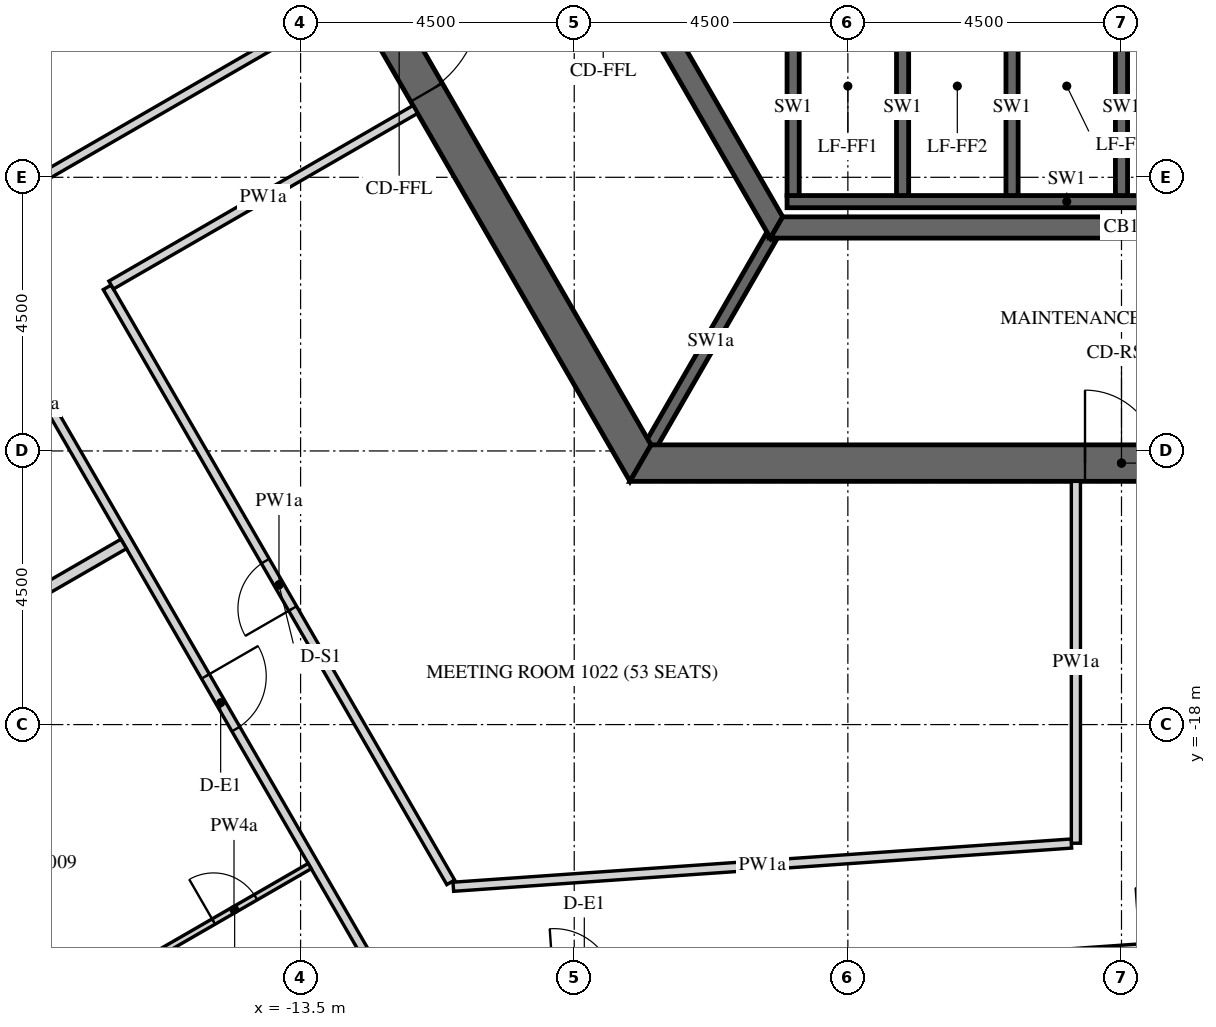
"""IFC4 building model, lengths in metres.
Left out: names, types, materials, properties, quantities, classifications, styles, units other than length and angle.
Written with IfcOpenShell. Run it as: python <this file> out.ifc"""

import sys

from ifc_helpers import new_model, si_unit, direction, frame, frame_2d, origin, place, context, subcontext, project, spatial, polyline, rectangle, outline, extrude, element, fill, save


model = new_model("IFC4")
c1 = context("Model", 3, precision=1e-05, world=origin(), true_north=direction((0.0, 1.0)))
c2 = subcontext(c1, "Body", "Model", "MODEL_VIEW")
j1 = project(units=[si_unit("LENGTHUNIT", "METRE"), si_unit("PLANEANGLEUNIT", "RADIAN")], contexts=[c1])
p1 = place(None, origin())
s1 = spatial("IfcSite", under=j1, at=p1, CompositionType="ELEMENT")
p2 = place(p1, origin())
s2 = spatial("IfcBuilding", under=s1, at=p2, CompositionType="ELEMENT")
p3 = place(p2, frame((0.0, 0.0, 135.0)))
s3 = spatial("IfcBuildingStorey", under=s2, at=p3, CompositionType="ELEMENT", Elevation=135.0)
p4 = place(p3, frame((-32.655, -2.89, -0.15), z_axis=(0.0, 0.0, 1.0), x_axis=(0.499997711317, -0.866026725152, 0.0)))
e1 = element("IfcWall", 1, at=p4, inside=s3, PredefinedType="SOLIDWALL", context=c2, shape_type="SweptSolid", body=[
    extrude(outline(polyline([(-0.022, -0.275), (30.097, -0.275), (30.045, 0.275), (0.022, 0.275), (-0.022, -0.275)])), origin(), (0.0, 0.0, 1.0), 3.9),
])
p5 = place(p4, frame((1.236, 0.0, 1.05)))
e2 = element("IfcOpeningElement", 2, at=p5, cuts=e1, PredefinedType="OPENING", context=c2, shape_type="SweptSolid", body=[
    extrude(rectangle(XDim=2.4, YDim=2.4, at=frame_2d((1.2, 1.2))), frame((0.0, 0.285, 0.0), z_axis=(0.0, -1.0, 0.0), x_axis=(1.0, 0.0, 0.0)), (0.0, 0.0, 1.0), 0.57),
])
p6 = place(p4, frame((4.835, 0.0, 1.05)))
e3 = element("IfcOpeningElement", 3, at=p6, cuts=e1, PredefinedType="OPENING", context=c2, shape_type="SweptSolid", body=[
    extrude(rectangle(XDim=2.4, YDim=2.4, at=frame_2d((1.2, 1.2))), frame((0.0, 0.285, 0.0), z_axis=(0.0, -1.0, 0.0), x_axis=(1.0, 0.0, 0.0)), (0.0, 0.0, 1.0), 0.57),
])
p7 = place(p4, frame((8.436, 0.0, 1.05)))
e4 = element("IfcOpeningElement", 4, at=p7, cuts=e1, PredefinedType="OPENING", context=c2, shape_type="SweptSolid", body=[
    extrude(rectangle(XDim=2.4, YDim=2.4, at=frame_2d((1.2, 1.2))), frame((0.0, 0.285, 0.0), z_axis=(0.0, -1.0, 0.0), x_axis=(1.0, 0.0, 0.0)), (0.0, 0.0, 1.0), 0.57),
])
p8 = place(p4, frame((12.035, 0.0, 1.05)))
e5 = element("IfcOpeningElement", 5, at=p8, cuts=e1, PredefinedType="OPENING", context=c2, shape_type="SweptSolid", body=[
    extrude(rectangle(XDim=2.4, YDim=2.4, at=frame_2d((1.2, 1.2))), frame((0.0, 0.285, 0.0), z_axis=(0.0, -1.0, 0.0), x_axis=(1.0, 0.0, 0.0)), (0.0, 0.0, 1.0), 0.57),
])
p9 = place(p4, frame((15.635, 0.0, 1.05)))
e6 = element("IfcOpeningElement", 6, at=p9, cuts=e1, PredefinedType="OPENING", context=c2, shape_type="SweptSolid", body=[
    extrude(rectangle(XDim=2.4, YDim=2.4, at=frame_2d((1.2, 1.2))), frame((0.0, 0.285, 0.0), z_axis=(0.0, -1.0, 0.0), x_axis=(1.0, 0.0, 0.0)), (0.0, 0.0, 1.0), 0.57),
])
p10 = place(p4, frame((19.236, 0.0, 1.05)))
e7 = element("IfcOpeningElement", 7, at=p10, cuts=e1, PredefinedType="OPENING", context=c2, shape_type="SweptSolid", body=[
    extrude(rectangle(XDim=2.4, YDim=2.4, at=frame_2d((1.2, 1.2))), frame((0.0, 0.285, 0.0), z_axis=(0.0, -1.0, 0.0), x_axis=(1.0, 0.0, 0.0)), (0.0, 0.0, 1.0), 0.57),
])
p11 = place(p4, frame((22.835, 0.0, 1.05)))
e8 = element("IfcOpeningElement", 8, at=p11, cuts=e1, PredefinedType="OPENING", context=c2, shape_type="SweptSolid", body=[
    extrude(rectangle(XDim=2.4, YDim=2.4, at=frame_2d((1.2, 1.2))), frame((0.0, 0.285, 0.0), z_axis=(0.0, -1.0, 0.0), x_axis=(1.0, 0.0, 0.0)), (0.0, 0.0, 1.0), 0.57),
])
p12 = place(p4, frame((26.436, 0.0, 1.05)))
e9 = element("IfcOpeningElement", 9, at=p12, cuts=e1, PredefinedType="OPENING", context=c2, shape_type="SweptSolid", body=[
    extrude(rectangle(XDim=2.4, YDim=2.4, at=frame_2d((1.2, 1.2))), frame((0.0, 0.285, 0.0), z_axis=(0.0, -1.0, 0.0), x_axis=(1.0, 0.0, 0.0)), (0.0, 0.0, 1.0), 0.57),
])
p13 = place(p3, frame((-15.819, 0.0, -0.15), z_axis=(0.0, 0.0, 1.0), x_axis=(0.499999880136, -0.866025472988, 0.0)))
e10 = element("IfcWall", 10, at=p13, inside=s3, PredefinedType="SHEAR", context=c2, shape_type="SweptSolid", body=[
    extrude(outline(polyline([(-0.173, -0.3), (15.993, -0.3), (15.646, 0.3), (0.173, 0.3), (-0.173, -0.3)])), origin(), (0.0, 0.0, 1.0), 3.9),
])
p14 = place(p13, frame((6.981, 0.0, 0.15)))
e11 = element("IfcOpeningElement", 11, at=p14, cuts=e10, PredefinedType="OPENING", context=c2, shape_type="SweptSolid", body=[
    extrude(rectangle(XDim=1.8, YDim=2.4, at=frame_2d((0.9, 1.2))), frame((0.0, 0.31, 0.0), z_axis=(0.0, -1.0, 0.0), x_axis=(1.0, 0.0, 0.0)), (0.0, 0.0, 1.0), 0.62),
])
p15 = place(p3, frame((-7.91, -13.7, -0.15), z_axis=(0.0, 0.0, 1.0), x_axis=(1.0, 0.0, 0.0)))
e12 = element("IfcWall", 12, at=p15, inside=s3, PredefinedType="SHEAR", context=c2, shape_type="SweptSolid", body=[
    extrude(outline(polyline([(-0.173, -0.3), (15.993, -0.3), (15.646, 0.3), (0.173, 0.3), (-0.173, -0.3)])), origin(), (0.0, 0.0, 1.0), 3.9),
])
p16 = place(p15, frame((7.31, 0.0, 0.15)))
e13 = element("IfcOpeningElement", 13, at=p16, cuts=e12, PredefinedType="OPENING", context=c2, shape_type="SweptSolid", body=[
    extrude(rectangle(XDim=1.2, YDim=2.4, at=frame_2d((0.6, 1.2))), frame((0.0, 0.31, 0.0), z_axis=(0.0, -1.0, 0.0), x_axis=(1.0, 0.0, 0.0)), (0.0, 0.0, 1.0), 0.62),
])
p17 = place(p3, frame((-11.345, 0.0, -0.15), z_axis=(0.0, 0.0, 1.0), x_axis=(0.499995046907, -0.866028263435, 0.0)))
e14 = element("IfcWall", 14, at=p17, inside=s3, PredefinedType="SHEAR", context=c2, shape_type="SweptSolid", body=[
    extrude(outline(polyline([(-0.101, -0.175), (11.446, -0.175), (11.244, 0.175), (0.101, 0.175), (-0.101, -0.175)])), origin(), (0.0, 0.0, 1.0), 3.9),
])
p18 = place(p17, frame((4.744, 0.0, 0.15)))
e15 = element("IfcOpeningElement", 15, at=p18, cuts=e14, PredefinedType="OPENING", context=c2, shape_type="SweptSolid", body=[
    extrude(rectangle(XDim=1.8, YDim=2.4, at=frame_2d((0.9, 1.2))), frame((0.0, 0.185, 0.0), z_axis=(0.0, -1.0, 0.0), x_axis=(1.0, 0.0, 0.0)), (0.0, 0.0, 1.0), 0.37),
])
p19 = place(p3, frame((-5.673, -9.825, -0.15), z_axis=(0.0, 0.0, 1.0), x_axis=(1.0, 0.0, 0.0)))
e16 = element("IfcWall", 16, at=p19, inside=s3, PredefinedType="SHEAR", context=c2, shape_type="SweptSolid", body=[
    extrude(outline(polyline([(-0.101, -0.175), (11.446, -0.175), (11.244, 0.175), (0.101, 0.175), (-0.101, -0.175)])), origin(), (0.0, 0.0, 1.0), 3.9),
])
p20 = place(p3, frame((-5.5, -9.4, -0.25), z_axis=(0.0, 0.0, 1.0), x_axis=(1.0, 0.0, 0.0)))
e17 = element("IfcWall", 17, at=p20, inside=s3, PredefinedType="SHEAR", context=c2, shape_type="SweptSolid", body=[
    extrude(rectangle(XDim=9.2, YDim=0.2, at=frame_2d((4.6, 0.0))), origin(), (0.0, 0.0, 1.0), 3.9),
])
for number, where, z_axis, x_axis in (
    (18, (-5.4, -9.3, -0.25), (0.0, 0.0, 1.0), (0.0, 1.0, 0.0)),
    (19, (-3.6, -9.3, -0.25), (0.0, 0.0, 1.0), (0.0, 1.0, 0.0)),
    (20, (-1.8, -9.3, -0.25), (0.0, 0.0, 1.0), (0.0, 1.0, 0.0)),
    (21, (0.0, -9.3, -0.25), (0.0, 0.0, 1.0), (0.0, 1.0, 0.0)),
):
    element("IfcWall", number, at=place(p3, frame(where, z_axis=z_axis, x_axis=x_axis)), inside=s3, PredefinedType="SHEAR", context=c2, shape_type="SweptSolid", body=[
        extrude(rectangle(XDim=2.9, YDim=0.2, at=frame_2d((1.45, 0.0))), origin(), (0.0, 0.0, 1.0), 3.9),
    ])
p21 = place(p3, frame((-5.773, -10.0, -0.15), z_axis=(0.0, 0.0, 1.0), x_axis=(-0.500038251005, -0.86600331843, 0.0)))
e22 = element("IfcWall", 22, at=p21, inside=s3, PredefinedType="SHEAR", context=c2, shape_type="SweptSolid", body=[
    extrude(rectangle(XDim=3.926, YDim=0.2, at=frame_2d((1.963, 0.0))), origin(), (0.0, 0.0, 1.0), 3.9),
])
p22 = place(p3, frame((-23.743, -2.175, 0.0), z_axis=(0.0, 0.0, 1.0), x_axis=(0.499992353047, -0.86602981871, 0.0)))
e23 = element("IfcWall", 23, at=p22, inside=s3, PredefinedType="PARTITIONING", context=c2, shape_type="SweptSolid", body=[
    extrude(rectangle(XDim=23.516, YDim=0.15, at=frame_2d((11.758, 0.0))), origin(), (0.0, 0.0, 1.0), 2.838),
])
p23 = place(p22, frame((10.099, 0.0, 0.0)))
e24 = element("IfcOpeningElement", 24, at=p23, cuts=e23, PredefinedType="OPENING", context=c2, shape_type="SweptSolid", body=[
    extrude(rectangle(XDim=1.0, YDim=2.1, at=frame_2d((0.5, 1.05))), frame((0.0, 0.085, 0.0), z_axis=(0.0, -1.0, 0.0), x_axis=(1.0, 0.0, 0.0)), (0.0, 0.0, 1.0), 0.17),
])
p24 = place(p22, frame((17.358, 0.0, 0.0)))
e25 = element("IfcOpeningElement", 25, at=p24, cuts=e23, PredefinedType="OPENING", context=c2, shape_type="SweptSolid", body=[
    extrude(rectangle(XDim=1.0, YDim=2.1, at=frame_2d((0.5, 1.05))), frame((0.0, 0.085, 0.0), z_axis=(0.0, -1.0, 0.0), x_axis=(1.0, 0.0, 0.0)), (0.0, 0.0, 1.0), 0.17),
])
p25 = place(p3, frame((-11.902, -22.535, 0.0), z_axis=(0.0, 0.0, 1.0), x_axis=(0.997563830208, 0.069759620556, 0.0)))
e26 = element("IfcWall", 26, at=p25, inside=s3, PredefinedType="PARTITIONING", context=c2, shape_type="SweptSolid", body=[
    extrude(rectangle(XDim=19.434, YDim=0.15, at=frame_2d((9.717, 0.0))), origin(), (0.0, 0.0, 1.0), 2.838),
])
p26 = place(p25, frame((2.575, 0.0, 0.0)))
e27 = element("IfcOpeningElement", 27, at=p26, cuts=e26, PredefinedType="OPENING", context=c2, shape_type="SweptSolid", body=[
    extrude(rectangle(XDim=1.0, YDim=2.1, at=frame_2d((0.5, 1.05))), frame((0.0, 0.085, 0.0), z_axis=(0.0, -1.0, 0.0), x_axis=(1.0, 0.0, 0.0)), (0.0, 0.0, 1.0), 0.17),
])
p27 = place(p25, frame((12.234, 0.0, 0.0)))
e28 = element("IfcOpeningElement", 28, at=p27, cuts=e26, PredefinedType="OPENING", context=c2, shape_type="SweptSolid", body=[
    extrude(rectangle(XDim=1.0, YDim=2.1, at=frame_2d((0.5, 1.05))), frame((0.0, 0.085, 0.0), z_axis=(0.0, -1.0, 0.0), x_axis=(1.0, 0.0, 0.0)), (0.0, 0.0, 1.0), 0.17),
])
p28 = place(p3, frame((-12.664, -6.066, 0.0), z_axis=(0.0, 0.0, 1.0), x_axis=(-0.866018092707, -0.500012662943, 0.0)))
e29 = element("IfcWall", 29, at=p28, inside=s3, PredefinedType="PARTITIONING", context=c2, shape_type="SweptSolid", body=[
    extrude(rectangle(XDim=5.85, YDim=0.15, at=frame_2d((2.925, 0.0))), origin(), (0.0, 0.0, 1.0), 2.838),
])
p29 = place(p3, frame((-0.75, -14.0, 0.0), z_axis=(0.0, 0.0, 1.0), x_axis=(0.0, -1.0, 0.0)))
e30 = element("IfcWall", 30, at=p29, inside=s3, PredefinedType="PARTITIONING", context=c2, shape_type="SweptSolid", body=[
    extrude(rectangle(XDim=5.951, YDim=0.15, at=frame_2d((2.976, 0.0))), origin(), (0.0, 0.0, 1.0), 2.838),
])
p30 = place(p3, frame((-0.825, -19.956, 0.0), z_axis=(0.0, 0.0, 1.0), x_axis=(-0.997562587881, -0.069777383582, 0.0)))
e31 = element("IfcWall", 31, at=p30, inside=s3, PredefinedType="PARTITIONING", context=c2, shape_type="SweptSolid", body=[
    extrude(rectangle(XDim=10.189, YDim=0.15, at=frame_2d((5.094, 0.0))), origin(), (0.0, 0.0, 1.0), 2.838),
])
p31 = place(p3, frame((-11.031, -20.595, 0.0), z_axis=(0.0, 0.0, 1.0), x_axis=(-0.499987422378, 0.866032665356, 0.0)))
e32 = element("IfcWall", 32, at=p31, inside=s3, PredefinedType="PARTITIONING", context=c2, shape_type="SweptSolid", body=[
    extrude(rectangle(XDim=11.299, YDim=0.15, at=frame_2d((5.649, 0.0))), origin(), (0.0, 0.0, 1.0), 2.838),
])
p32 = place(p31, frame((5.199, 0.0, 0.0)))
e33 = element("IfcOpeningElement", 33, at=p32, cuts=e32, PredefinedType="OPENING", context=c2, shape_type="SweptSolid", body=[
    extrude(rectangle(XDim=0.9, YDim=2.1, at=frame_2d((0.45, 1.05))), frame((0.0, 0.085, 0.0), z_axis=(0.0, -1.0, 0.0), x_axis=(1.0, 0.0, 0.0)), (0.0, 0.0, 1.0), 0.17),
])
p33 = place(p3, frame((-16.615, -10.772, 0.0), z_axis=(0.0, 0.0, 1.0), x_axis=(0.866025774745, 0.499999357477, 0.0)))
e34 = element("IfcWall", 34, at=p33, inside=s3, PredefinedType="PARTITIONING", context=c2, shape_type="SweptSolid", body=[
    extrude(rectangle(XDim=5.775, YDim=0.15, at=frame_2d((2.887, 0.0))), origin(), (0.0, 0.0, 1.0), 2.838),
])
p34 = place(p3, frame((-23.099, -18.892, 0.0), z_axis=(0.0, 0.0, 1.0), x_axis=(0.866019273868, 0.500010617176, 0.0)))
e35 = element("IfcWall", 35, at=p34, inside=s3, PredefinedType="PARTITIONING", context=c2, shape_type="SweptSolid", body=[
    extrude(rectangle(XDim=7.725, YDim=0.18, at=frame_2d((3.862, 0.0))), origin(), (0.0, 0.0, 1.0), 2.838),
])
p35 = place(p3, frame((-15.84, -21.764, 0.0), z_axis=(0.0, 0.0, 1.0), x_axis=(0.866039941686, 0.499974818771, 0.0)))
e36 = element("IfcWall", 36, at=p35, inside=s3, PredefinedType="PARTITIONING", context=c2, shape_type="SweptSolid", body=[
    extrude(rectangle(XDim=2.875, YDim=0.1, at=frame_2d((1.438, 0.0))), origin(), (0.0, 0.0, 1.0), 2.838),
])
p36 = place(p35, frame((1.05, 0.0, 0.0)))
e37 = element("IfcOpeningElement", 37, at=p36, cuts=e36, PredefinedType="OPENING", context=c2, shape_type="SweptSolid", body=[
    extrude(rectangle(XDim=0.8, YDim=2.1, at=frame_2d((0.4, 1.05))), frame((0.0, 0.06, 0.0), z_axis=(0.0, -1.0, 0.0), x_axis=(1.0, 0.0, 0.0)), (0.0, 0.0, 1.0), 0.12),
])
p37 = place(p14, origin())
e38 = element("IfcDoor", 38, at=p37, inside=s3, OperationType="DOUBLE_DOOR_SINGLE_SWING", PredefinedType="DOOR", context=c2, shape_type="SweptSolid", body=[
    extrude(rectangle(XDim=1.8, YDim=2.4, at=frame_2d((0.9, 1.2))), frame((0.0, 0.025, 0.0), z_axis=(0.0, -1.0, 0.0), x_axis=(1.0, 0.0, 0.0)), (0.0, 0.0, 1.0), 0.05),
])
fill(e11, e38)
p38 = place(p16, origin())
e39 = element("IfcDoor", 39, at=p38, inside=s3, OperationType="SINGLE_SWING_LEFT", PredefinedType="DOOR", context=c2, shape_type="SweptSolid", body=[
    extrude(rectangle(XDim=1.2, YDim=2.4, at=frame_2d((0.6, 1.2))), frame((0.0, 0.025, 0.0), z_axis=(0.0, -1.0, 0.0), x_axis=(1.0, 0.0, 0.0)), (0.0, 0.0, 1.0), 0.05),
])
fill(e13, e39)
p39 = place(p24, origin())
e40 = element("IfcDoor", 40, at=p39, inside=s3, OperationType="SINGLE_SWING_RIGHT", PredefinedType="DOOR", context=c2, shape_type="SweptSolid", body=[
    extrude(rectangle(XDim=1.0, YDim=2.1, at=frame_2d((0.5, 1.05))), frame((0.0, 0.025, 0.0), z_axis=(0.0, -1.0, 0.0), x_axis=(1.0, 0.0, 0.0)), (0.0, 0.0, 1.0), 0.05),
])
fill(e25, e40)
p40 = place(p36, origin())
e41 = element("IfcDoor", 41, at=p40, inside=s3, OperationType="SINGLE_SWING_LEFT", PredefinedType="DOOR", context=c2, shape_type="SweptSolid", body=[
    extrude(rectangle(XDim=0.8, YDim=2.1, at=frame_2d((0.4, 1.05))), frame((0.0, 0.025, 0.0), z_axis=(0.0, -1.0, 0.0), x_axis=(1.0, 0.0, 0.0)), (0.0, 0.0, 1.0), 0.05),
])
fill(e37, e41)
p41 = place(p32, origin())
e42 = element("IfcDoor", 42, at=p41, inside=s3, OperationType="SINGLE_SWING_RIGHT", PredefinedType="DOOR", context=c2, shape_type="SweptSolid", body=[
    extrude(rectangle(XDim=0.9, YDim=2.1, at=frame_2d((0.45, 1.05))), frame((0.0, 0.025, 0.0), z_axis=(0.0, -1.0, 0.0), x_axis=(1.0, 0.0, 0.0)), (0.0, 0.0, 1.0), 0.05),
])
fill(e33, e42)
save(model, sys.argv[1])
